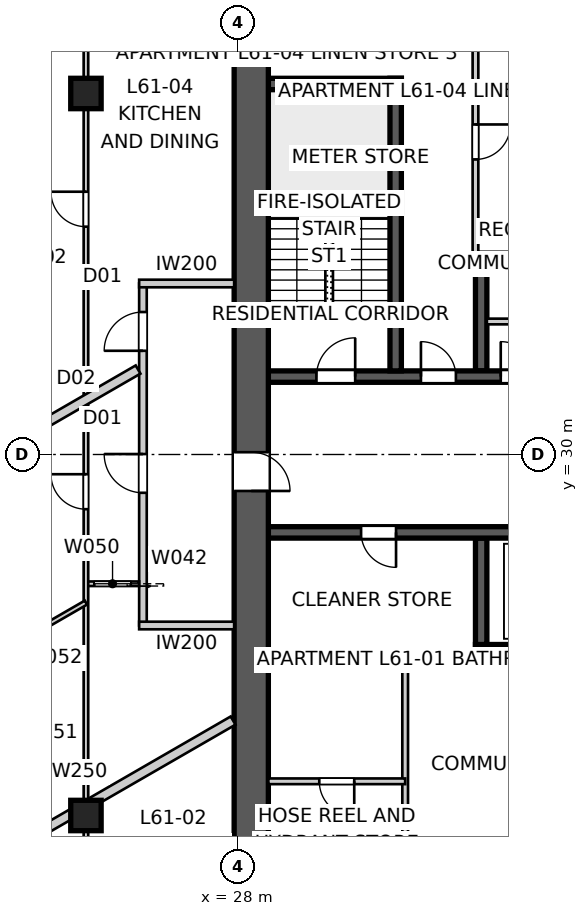
"""IFC4 building model, lengths in metres.
Left out: names, types, materials, properties, quantities, classifications, styles, units other than length and angle.
Written with IfcOpenShell. Run it as: python <this file> out.ifc"""

import sys

from ifc_helpers import new_model, si_unit, direction, frame, frame_2d, origin, origin_2d, place, context, subcontext, project, spatial, polyline, rectangle, outline, extrude, element, fill, save


model = new_model("IFC4")
c1 = context("Model", 3, precision=1e-05, world=origin(), true_north=direction((0.0, 1.0)))
c2 = subcontext(c1, "Body", "Model", "MODEL_VIEW")
j1 = project(units=[si_unit("LENGTHUNIT", "METRE"), si_unit("PLANEANGLEUNIT", "RADIAN")], contexts=[c1])
p1 = place(None, origin())
s1 = spatial("IfcSite", under=j1, at=p1, CompositionType="ELEMENT")
p2 = place(p1, origin())
s2 = spatial("IfcBuilding", under=s1, at=p2, CompositionType="ELEMENT")
p3 = place(p2, frame((0.0, 0.0, 221.8)))
s3 = spatial("IfcBuildingStorey", under=s2, at=p3, CompositionType="ELEMENT", Elevation=221.8)
p4 = place(p3, frame((28.35, 41.2, 0.0), z_axis=(0.0, 0.0, 1.0), x_axis=(0.0, -1.0, 0.0)))
e1 = element("IfcWall", 1, at=p4, inside=s3, PredefinedType="SHEAR", context=c2, shape_type="SweptSolid", body=[
    extrude(outline(polyline([(0.0, -0.45), (22.4, -0.45), (22.4, -0.025), (22.85, -0.025), (22.85, 0.025), (22.4, 0.025), (22.4, 0.45), (0.0, 0.45), (0.0, 0.025), (-0.45, 0.025), (-0.45, -0.025), (0.0, -0.025), (0.0, -0.45)])), origin(), (0.0, 0.0, 1.0), 3.4),
])
p5 = place(p4, frame((11.14, 0.0, 0.0)))
e2 = element("IfcOpeningElement", 2, at=p5, cuts=e1, PredefinedType="OPENING", context=c2, shape_type="SweptSolid", body=[
    extrude(rectangle(XDim=1.02, YDim=2.4, at=frame_2d((0.51, 1.2))), frame((0.0, 0.46, 0.0), z_axis=(0.0, -1.0, 0.0), x_axis=(1.0, 0.0, 0.0)), (0.0, 0.0, 1.0), 0.92),
])
p6 = place(p3, frame((28.8, 32.05, 0.0), z_axis=(0.0, 0.0, 1.0), x_axis=(1.0, 0.0, 0.0)))
e3 = element("IfcWall", 3, at=p6, inside=s3, PredefinedType="SHEAR", context=c2, shape_type="SweptSolid", body=[
    extrude(rectangle(XDim=22.4, YDim=0.3, at=frame_2d((11.2, 0.0))), origin(), (0.0, 0.0, 1.0), 3.4),
])
p7 = place(p6, frame((19.04, 0.0, 0.0)))
e4 = element("IfcOpeningElement", 4, at=p7, cuts=e3, PredefinedType="OPENING", context=c2, shape_type="SweptSolid", body=[
    extrude(rectangle(XDim=0.92, YDim=2.1, at=frame_2d((0.46, 1.05))), frame((0.0, 0.16, 0.0), z_axis=(0.0, -1.0, 0.0), x_axis=(1.0, 0.0, 0.0)), (0.0, 0.0, 1.0), 0.32),
])
p8 = place(p6, frame((1.265, 0.0, 0.0)))
e5 = element("IfcOpeningElement", 5, at=p8, cuts=e3, PredefinedType="OPENING", context=c2, shape_type="SweptSolid", body=[
    extrude(rectangle(XDim=1.02, YDim=2.1, at=frame_2d((0.51, 1.05))), frame((0.0, 0.16, 0.0), z_axis=(0.0, -1.0, 0.0), x_axis=(1.0, 0.0, 0.0)), (0.0, 0.0, 1.0), 0.32),
])
p9 = place(p6, frame((4.015, 0.0, 0.0)))
e6 = element("IfcOpeningElement", 6, at=p9, cuts=e3, PredefinedType="OPENING", context=c2, shape_type="SweptSolid", body=[
    extrude(rectangle(XDim=0.92, YDim=2.1, at=frame_2d((0.46, 1.05))), frame((0.0, 0.16, 0.0), z_axis=(0.0, -1.0, 0.0), x_axis=(1.0, 0.0, 0.0)), (0.0, 0.0, 1.0), 0.32),
])
p10 = place(p6, frame((6.115, 0.0, 0.0)))
e7 = element("IfcOpeningElement", 7, at=p10, cuts=e3, PredefinedType="OPENING", context=c2, shape_type="SweptSolid", body=[
    extrude(rectangle(XDim=0.92, YDim=2.1, at=frame_2d((0.46, 1.05))), frame((0.0, 0.16, 0.0), z_axis=(0.0, -1.0, 0.0), x_axis=(1.0, 0.0, 0.0)), (0.0, 0.0, 1.0), 0.32),
])
p11 = place(p6, frame((9.79, 0.0, 0.0)))
e8 = element("IfcOpeningElement", 8, at=p11, cuts=e3, PredefinedType="OPENING", context=c2, shape_type="SweptSolid", body=[
    extrude(rectangle(XDim=0.92, YDim=2.1, at=frame_2d((0.46, 1.05))), frame((0.0, 0.16, 0.0), z_axis=(0.0, -1.0, 0.0), x_axis=(1.0, 0.0, 0.0)), (0.0, 0.0, 1.0), 0.32),
])
p12 = place(p6, frame((12.05, 0.0, 0.0)))
e9 = element("IfcOpeningElement", 9, at=p12, cuts=e3, PredefinedType="OPENING", context=c2, shape_type="SweptSolid", body=[
    extrude(rectangle(XDim=1.1, YDim=2.1, at=frame_2d((0.55, 1.05))), frame((0.0, 0.16, 0.0), z_axis=(0.0, -1.0, 0.0), x_axis=(1.0, 0.0, 0.0)), (0.0, 0.0, 1.0), 0.32),
])
p13 = place(p6, frame((14.85, 0.0, 0.0)))
e10 = element("IfcOpeningElement", 10, at=p13, cuts=e3, PredefinedType="OPENING", context=c2, shape_type="SweptSolid", body=[
    extrude(rectangle(XDim=1.1, YDim=2.1, at=frame_2d((0.55, 1.05))), frame((0.0, 0.16, 0.0), z_axis=(0.0, -1.0, 0.0), x_axis=(1.0, 0.0, 0.0)), (0.0, 0.0, 1.0), 0.32),
])
p14 = place(p3, frame((51.2, 27.95, 0.0), z_axis=(0.0, 0.0, 1.0), x_axis=(-1.0, 0.0, 0.0)))
e11 = element("IfcWall", 11, at=p14, inside=s3, PredefinedType="SHEAR", context=c2, shape_type="SweptSolid", body=[
    extrude(rectangle(XDim=22.4, YDim=0.3, at=frame_2d((11.2, 0.0))), origin(), (0.0, 0.0, 1.0), 3.4),
])
p15 = place(p14, frame((19.04, 0.0, 0.0)))
e12 = element("IfcOpeningElement", 12, at=p15, cuts=e11, PredefinedType="OPENING", context=c2, shape_type="SweptSolid", body=[
    extrude(rectangle(XDim=0.92, YDim=2.1, at=frame_2d((0.46, 1.05))), frame((0.0, 0.16, 0.0), z_axis=(0.0, -1.0, 0.0), x_axis=(1.0, 0.0, 0.0)), (0.0, 0.0, 1.0), 0.32),
])
p16 = place(p14, frame((1.265, 0.0, 0.0)))
e13 = element("IfcOpeningElement", 13, at=p16, cuts=e11, PredefinedType="OPENING", context=c2, shape_type="SweptSolid", body=[
    extrude(rectangle(XDim=1.02, YDim=2.1, at=frame_2d((0.51, 1.05))), frame((0.0, 0.16, 0.0), z_axis=(0.0, -1.0, 0.0), x_axis=(1.0, 0.0, 0.0)), (0.0, 0.0, 1.0), 0.32),
])
p17 = place(p14, frame((4.015, 0.0, 0.0)))
e14 = element("IfcOpeningElement", 14, at=p17, cuts=e11, PredefinedType="OPENING", context=c2, shape_type="SweptSolid", body=[
    extrude(rectangle(XDim=0.92, YDim=2.1, at=frame_2d((0.46, 1.05))), frame((0.0, 0.16, 0.0), z_axis=(0.0, -1.0, 0.0), x_axis=(1.0, 0.0, 0.0)), (0.0, 0.0, 1.0), 0.32),
])
p18 = place(p14, frame((9.34, 0.0, 0.0)))
e15 = element("IfcOpeningElement", 15, at=p18, cuts=e11, PredefinedType="OPENING", context=c2, shape_type="SweptSolid", body=[
    extrude(rectangle(XDim=0.92, YDim=2.1, at=frame_2d((0.46, 1.05))), frame((0.0, 0.16, 0.0), z_axis=(0.0, -1.0, 0.0), x_axis=(1.0, 0.0, 0.0)), (0.0, 0.0, 1.0), 0.32),
])
p19 = place(p14, frame((7.015, 0.0, 0.0)))
e16 = element("IfcOpeningElement", 16, at=p19, cuts=e11, PredefinedType="OPENING", context=c2, shape_type="SweptSolid", body=[
    extrude(rectangle(XDim=0.92, YDim=2.1, at=frame_2d((0.46, 1.05))), frame((0.0, 0.16, 0.0), z_axis=(0.0, -1.0, 0.0), x_axis=(1.0, 0.0, 0.0)), (0.0, 0.0, 1.0), 0.32),
])
p20 = place(p14, frame((12.05, 0.0, 0.0)))
e17 = element("IfcOpeningElement", 17, at=p20, cuts=e11, PredefinedType="OPENING", context=c2, shape_type="SweptSolid", body=[
    extrude(rectangle(XDim=1.1, YDim=2.1, at=frame_2d((0.55, 1.05))), frame((0.0, 0.16, 0.0), z_axis=(0.0, -1.0, 0.0), x_axis=(1.0, 0.0, 0.0)), (0.0, 0.0, 1.0), 0.32),
])
p21 = place(p14, frame((14.85, 0.0, 0.0)))
e18 = element("IfcOpeningElement", 18, at=p21, cuts=e11, PredefinedType="OPENING", context=c2, shape_type="SweptSolid", body=[
    extrude(rectangle(XDim=1.1, YDim=2.1, at=frame_2d((0.55, 1.05))), frame((0.0, 0.16, 0.0), z_axis=(0.0, -1.0, 0.0), x_axis=(1.0, 0.0, 0.0)), (0.0, 0.0, 1.0), 0.32),
])
for number, where, z_axis, x_axis in (
    (19, (34.25, 35.15, 0.0), (0.0, 0.0, 1.0), (1.0, 0.0, 0.0)),
    (20, (45.75, 24.85, 0.0), (0.0, 0.0, 1.0), (-1.0, 0.0, 0.0)),
):
    element("IfcWall", number, at=place(p3, frame(where, z_axis=z_axis, x_axis=x_axis)), inside=s3, PredefinedType="SHEAR", context=c2, shape_type="SweptSolid", body=[
        extrude(rectangle(XDim=11.5, YDim=0.3, at=frame_2d((5.75, 0.0))), origin(), (0.0, 0.0, 1.0), 3.4),
    ])
for number, where, z_axis, x_axis in (
    (21, (34.4, 32.2, 0.0), (0.0, 0.0, 1.0), (0.0, 1.0, 0.0)),
    (22, (34.4, 27.8, 0.0), (0.0, 0.0, 1.0), (0.0, -1.0, 0.0)),
):
    element("IfcWall", number, at=place(p3, frame(where, z_axis=z_axis, x_axis=x_axis)), inside=s3, PredefinedType="SHEAR", context=c2, shape_type="SweptSolid", body=[
        extrude(rectangle(XDim=2.8, YDim=0.3, at=frame_2d((1.4, 0.0))), origin(), (0.0, 0.0, 1.0), 3.4),
    ])
p22 = place(p3, frame((32.15, 32.2, 0.0), z_axis=(0.0, 0.0, 1.0), x_axis=(0.0, 1.0, 0.0)))
e23 = element("IfcWall", 23, at=p22, inside=s3, PredefinedType="SHEAR", context=c2, shape_type="SweptSolid", body=[
    extrude(rectangle(XDim=7.7, YDim=0.3, at=frame_2d((3.85, 0.0))), origin(), (0.0, 0.0, 1.0), 3.4),
])
p23 = place(p3, frame((28.8, 39.75, 0.0), z_axis=(0.0, 0.0, 1.0), x_axis=(1.0, 0.0, 0.0)))
e24 = element("IfcWall", 24, at=p23, inside=s3, PredefinedType="SHEAR", context=c2, shape_type="SweptSolid", body=[
    extrude(rectangle(XDim=3.5, YDim=0.3, at=frame_2d((1.75, 0.0))), origin(), (0.0, 0.0, 1.0), 3.4),
])
for number, where, z_axis, x_axis in (
    (25, (24.0, 39.5, 0.0), (0.0, 0.0, 1.0), (1.0, 0.0, 0.0)),
    (26, (24.0, 20.5, 0.0), (0.0, 0.0, 1.0), (1.0, 0.0, 0.0)),
):
    element("IfcColumn", number, at=place(p3, frame(where, z_axis=z_axis, x_axis=x_axis)), inside=s3, PredefinedType="COLUMN", context=c2, shape_type="SweptSolid", body=[
        extrude(rectangle(XDim=0.8, YDim=0.8, at=origin_2d()), origin(), (0.0, 0.0, 1.0), 3.4),
    ])
p24 = place(p3, frame((25.5, 25.5, 0.0), z_axis=(0.0, 0.0, 1.0), x_axis=(0.0, 1.0, 0.0)))
e27 = element("IfcWall", 27, at=p24, inside=s3, PredefinedType="PARTITIONING", context=c2, shape_type="SweptSolid", body=[
    extrude(rectangle(XDim=9.0, YDim=0.2, at=frame_2d((4.5, 0.0))), origin(), (0.0, 0.0, 1.0), 3.25),
])
p25 = place(p24, frame((3.492, 0.0, 0.0)))
e28 = element("IfcOpeningElement", 28, at=p25, cuts=e27, PredefinedType="OPENING", context=c2, shape_type="SweptSolid", body=[
    extrude(rectangle(XDim=1.02, YDim=2.34, at=frame_2d((0.51, 1.17))), frame((0.0, 0.11, 0.0), z_axis=(0.0, -1.0, 0.0), x_axis=(1.0, 0.0, 0.0)), (0.0, 0.0, 1.0), 0.22),
])
p26 = place(p24, frame((7.229, 0.0, 0.0)))
e29 = element("IfcOpeningElement", 29, at=p26, cuts=e27, PredefinedType="OPENING", context=c2, shape_type="SweptSolid", body=[
    extrude(rectangle(XDim=1.02, YDim=2.34, at=frame_2d((0.51, 1.17))), frame((0.0, 0.11, 0.0), z_axis=(0.0, -1.0, 0.0), x_axis=(1.0, 0.0, 0.0)), (0.0, 0.0, 1.0), 0.22),
])
for number, where, z_axis, x_axis in (
    (30, (27.9, 34.5, 0.0), (0.0, 0.0, 1.0), (-1.0, 0.0, 0.0)),
    (31, (27.9, 25.5, 0.0), (0.0, 0.0, 1.0), (-1.0, 0.0, 0.0)),
):
    element("IfcWall", number, at=place(p3, frame(where, z_axis=z_axis, x_axis=x_axis)), inside=s3, PredefinedType="PARTITIONING", context=c2, shape_type="SweptSolid", body=[
        extrude(rectangle(XDim=2.5, YDim=0.2, at=frame_2d((1.25, 0.0))), origin(), (0.0, 0.0, 1.0), 3.25),
    ])
p27 = place(p3, frame((15.889, 26.761, 0.0), z_axis=(0.0, 0.0, 1.0), x_axis=(0.866024069551, 0.500002310952, 0.0)))
e32 = element("IfcWall", 32, at=p27, inside=s3, PredefinedType="PARTITIONING", context=c2, shape_type="SweptSolid", body=[
    extrude(rectangle(XDim=10.95, YDim=0.25, at=frame_2d((5.475, 0.0))), origin(), (0.0, 0.0, 1.0), 3.25),
])
p28 = place(p3, frame((20.514, 18.75, 0.0), z_axis=(0.0, 0.0, 1.0), x_axis=(0.866020489494, 0.500008511703, 0.0)))
e33 = element("IfcWall", 33, at=p28, inside=s3, PredefinedType="PARTITIONING", context=c2, shape_type="SweptSolid", body=[
    extrude(rectangle(XDim=8.496, YDim=0.25, at=frame_2d((4.248, 0.0))), origin(), (0.0, 0.0, 1.0), 3.25),
])
p29 = place(p3, frame((34.25, 41.2, 0.0), z_axis=(0.0, 0.0, 1.0), x_axis=(0.0, -1.0, 0.0)))
e34 = element("IfcWall", 34, at=p29, inside=s3, PredefinedType="SOLIDWALL", context=c2, shape_type="SweptSolid", body=[
    extrude(rectangle(XDim=5.95, YDim=0.15, at=frame_2d((2.975, 0.0))), origin(), (0.0, 0.0, 1.0), 3.25),
])
p30 = place(p29, frame((2.515, 0.0, 0.0)))
e35 = element("IfcOpeningElement", 35, at=p30, cuts=e34, PredefinedType="OPENING", context=c2, shape_type="SweptSolid", body=[
    extrude(rectangle(XDim=0.92, YDim=2.1, at=frame_2d((0.46, 1.05))), frame((0.0, 0.085, 0.0), z_axis=(0.0, -1.0, 0.0), x_axis=(1.0, 0.0, 0.0)), (0.0, 0.0, 1.0), 0.17),
])
p31 = place(p3, frame((32.4, 18.8, 0.0), z_axis=(0.0, 0.0, 1.0), x_axis=(0.0, 1.0, 0.0)))
e36 = element("IfcWall", 36, at=p31, inside=s3, PredefinedType="SOLIDWALL", context=c2, shape_type="SweptSolid", body=[
    extrude(rectangle(XDim=5.9, YDim=0.15, at=frame_2d((2.95, 0.0))), origin(), (0.0, 0.0, 1.0), 3.25),
])
p32 = place(p3, frame((32.4, 24.7, 0.0), z_axis=(0.0, 0.0, 1.0), x_axis=(1.0, 0.0, 0.0)))
e37 = element("IfcWall", 37, at=p32, inside=s3, PredefinedType="SOLIDWALL", context=c2, shape_type="SweptSolid", body=[
    extrude(rectangle(XDim=1.85, YDim=0.15, at=frame_2d((0.925, 0.0))), origin(), (0.0, 0.0, 1.0), 3.25),
])
p33 = place(p3, frame((32.4, 21.4, 0.0), z_axis=(0.0, 0.0, 1.0), x_axis=(-1.0, 0.0, 0.0)))
e38 = element("IfcWall", 38, at=p33, inside=s3, PredefinedType="SOLIDWALL", context=c2, shape_type="SweptSolid", body=[
    extrude(rectangle(XDim=3.6, YDim=0.15, at=frame_2d((1.8, 0.0))), origin(), (0.0, 0.0, 1.0), 3.25),
])
p34 = place(p33, frame((1.34, 0.0, 0.0)))
e39 = element("IfcOpeningElement", 39, at=p34, cuts=e38, PredefinedType="OPENING", context=c2, shape_type="SweptSolid", body=[
    extrude(rectangle(XDim=0.92, YDim=2.1, at=frame_2d((0.46, 1.05))), frame((0.0, 0.085, 0.0), z_axis=(0.0, -1.0, 0.0), x_axis=(1.0, 0.0, 0.0)), (0.0, 0.0, 1.0), 0.17),
])
p35 = place(p3, frame((25.4, 26.598, 0.0), z_axis=(0.0, 0.0, 1.0), x_axis=(-1.0, 0.0, 0.0)))
e40 = element("IfcWall", 40, at=p35, inside=s3, PredefinedType="PARTITIONING", context=c2, shape_type="SweptSolid", body=[
    extrude(rectangle(XDim=1.4, YDim=0.12, at=frame_2d((0.7, 0.0))), origin(), (0.0, 0.0, 1.0), 3.25),
])
p36 = place(p35, frame((0.22, 0.0, 0.0)))
e41 = element("IfcOpeningElement", 41, at=p36, cuts=e40, PredefinedType="OPENING", context=c2, shape_type="SweptSolid", body=[
    extrude(rectangle(XDim=0.96, YDim=2.1, at=frame_2d((0.48, 1.05))), frame((0.0, 0.07, 0.0), z_axis=(0.0, -1.0, 0.0), x_axis=(1.0, 0.0, 0.0)), (0.0, 0.0, 1.0), 0.14),
])
p37 = place(p3, frame((24.0, 15.422, 0.0), z_axis=(0.0, 0.0, 1.0), x_axis=(0.0, 1.0, 0.0)))
e42 = element("IfcWall", 42, at=p37, inside=s3, PredefinedType="PARTITIONING", context=c2, shape_type="SweptSolid", body=[
    extrude(rectangle(XDim=26.045, YDim=0.12, at=frame_2d((13.022, 0.0))), origin(), (0.0, 0.0, 1.0), 2.55),
])
p38 = place(p37, frame((13.139, 0.0, 0.0)))
e43 = element("IfcOpeningElement", 43, at=p38, cuts=e42, PredefinedType="OPENING", context=c2, shape_type="SweptSolid", body=[
    extrude(rectangle(XDim=0.92, YDim=2.34, at=frame_2d((0.46, 1.17))), frame((0.0, 0.07, 0.0), z_axis=(0.0, -1.0, 0.0), x_axis=(1.0, 0.0, 0.0)), (0.0, 0.0, 1.0), 0.14),
])
p39 = place(p37, frame((20.573, 0.0, 0.0)))
e44 = element("IfcOpeningElement", 44, at=p39, cuts=e42, PredefinedType="OPENING", context=c2, shape_type="SweptSolid", body=[
    extrude(rectangle(XDim=0.92, YDim=2.34, at=frame_2d((0.46, 1.17))), frame((0.0, 0.07, 0.0), z_axis=(0.0, -1.0, 0.0), x_axis=(1.0, 0.0, 0.0)), (0.0, 0.0, 1.0), 0.14),
])
p40 = place(p37, frame((0.42, 0.0, 0.0)))
e45 = element("IfcOpeningElement", 45, at=p40, cuts=e42, PredefinedType="OPENING", context=c2, shape_type="SweptSolid", body=[
    extrude(rectangle(XDim=0.92, YDim=2.34, at=frame_2d((0.46, 1.17))), frame((0.0, 0.07, 0.0), z_axis=(0.0, -1.0, 0.0), x_axis=(1.0, 0.0, 0.0)), (0.0, 0.0, 1.0), 0.14),
])
p41 = place(p3, frame((24.0, 26.103, 0.0), z_axis=(0.0, 0.0, 1.0), x_axis=(-0.866017585169, -0.500013541994, 0.0)))
e46 = element("IfcWall", 46, at=p41, inside=s3, PredefinedType="PARTITIONING", context=c2, shape_type="SweptSolid", body=[
    extrude(rectangle(XDim=6.655, YDim=0.12, at=frame_2d((3.328, 0.0))), origin(), (0.0, 0.0, 1.0), 3.25),
])
p42 = place(p41, frame((2.887, 0.0, 0.0)))
e47 = element("IfcOpeningElement", 47, at=p42, cuts=e46, PredefinedType="OPENING", context=c2, shape_type="SweptSolid", body=[
    extrude(rectangle(XDim=0.92, YDim=2.34, at=frame_2d((0.46, 1.17))), frame((0.0, 0.07, 0.0), z_axis=(0.0, -1.0, 0.0), x_axis=(1.0, 0.0, 0.0)), (0.0, 0.0, 1.0), 0.14),
])
p43 = place(p3, frame((34.55, 33.5, 0.0), z_axis=(0.0, 0.0, 1.0), x_axis=(1.0, 0.0, 0.0)))
e48 = element("IfcWall", 48, at=p43, inside=s3, PredefinedType="SOLIDWALL", context=c2, shape_type="SweptSolid", body=[
    extrude(rectangle(XDim=5.35, YDim=0.15, at=frame_2d((2.675, 0.0))), origin(), (0.0, 0.0, 1.0), 3.25),
])
p44 = place(p43, frame((2.215, 0.0, 0.0)))
e49 = element("IfcOpeningElement", 49, at=p44, cuts=e48, PredefinedType="OPENING", context=c2, shape_type="SweptSolid", body=[
    extrude(rectangle(XDim=0.92, YDim=2.1, at=frame_2d((0.46, 1.05))), frame((0.0, 0.085, 0.0), z_axis=(0.0, -1.0, 0.0), x_axis=(1.0, 0.0, 0.0)), (0.0, 0.0, 1.0), 0.17),
])
p45 = place(p15, origin())
e50 = element("IfcDoor", 50, at=p45, inside=s3, OperationType="SINGLE_SWING_LEFT", PredefinedType="DOOR", context=c2, shape_type="SweptSolid", body=[
    extrude(rectangle(XDim=0.92, YDim=2.1, at=frame_2d((0.46, 1.05))), frame((0.0, 0.025, 0.0), z_axis=(0.0, -1.0, 0.0), x_axis=(1.0, 0.0, 0.0)), (0.0, 0.0, 1.0), 0.05),
])
fill(e12, e50)
p46 = place(p8, origin())
e51 = element("IfcDoor", 51, at=p46, inside=s3, OperationType="SINGLE_SWING_RIGHT", PredefinedType="DOOR", context=c2, shape_type="SweptSolid", body=[
    extrude(rectangle(XDim=1.02, YDim=2.1, at=frame_2d((0.51, 1.05))), frame((0.0, 0.025, 0.0), z_axis=(0.0, -1.0, 0.0), x_axis=(1.0, 0.0, 0.0)), (0.0, 0.0, 1.0), 0.05),
])
fill(e5, e51)
p47 = place(p9, origin())
e52 = element("IfcDoor", 52, at=p47, inside=s3, OperationType="SINGLE_SWING_LEFT", PredefinedType="DOOR", context=c2, shape_type="SweptSolid", body=[
    extrude(rectangle(XDim=0.92, YDim=2.1, at=frame_2d((0.46, 1.05))), frame((0.0, 0.025, 0.0), z_axis=(0.0, -1.0, 0.0), x_axis=(1.0, 0.0, 0.0)), (0.0, 0.0, 1.0), 0.05),
])
fill(e6, e52)
p48 = place(p25, origin())
e53 = element("IfcDoor", 53, at=p48, inside=s3, OperationType="SINGLE_SWING_RIGHT", PredefinedType="DOOR", context=c2, shape_type="SweptSolid", body=[
    extrude(rectangle(XDim=1.02, YDim=2.34, at=frame_2d((0.51, 1.17))), frame((0.0, 0.025, 0.0), z_axis=(0.0, -1.0, 0.0), x_axis=(1.0, 0.0, 0.0)), (0.0, 0.0, 1.0), 0.05),
])
fill(e28, e53)
p49 = place(p26, origin())
e54 = element("IfcDoor", 54, at=p49, inside=s3, OperationType="SINGLE_SWING_LEFT", PredefinedType="DOOR", context=c2, shape_type="SweptSolid", body=[
    extrude(rectangle(XDim=1.02, YDim=2.34, at=frame_2d((0.51, 1.17))), frame((0.0, 0.025, 0.0), z_axis=(0.0, -1.0, 0.0), x_axis=(1.0, 0.0, 0.0)), (0.0, 0.0, 1.0), 0.05),
])
fill(e29, e54)
p50 = place(p34, origin())
e55 = element("IfcDoor", 55, at=p50, inside=s3, OperationType="SINGLE_SWING_LEFT", PredefinedType="DOOR", context=c2, shape_type="SweptSolid", body=[
    extrude(rectangle(XDim=0.92, YDim=2.1, at=frame_2d((0.46, 1.05))), frame((0.0, 0.025, 0.0), z_axis=(0.0, -1.0, 0.0), x_axis=(1.0, 0.0, 0.0)), (0.0, 0.0, 1.0), 0.05),
])
fill(e39, e55)
p51 = place(p30, origin())
e56 = element("IfcDoor", 56, at=p51, inside=s3, OperationType="SINGLE_SWING_LEFT", PredefinedType="DOOR", context=c2, shape_type="SweptSolid", body=[
    extrude(rectangle(XDim=0.92, YDim=2.1, at=frame_2d((0.46, 1.05))), frame((0.0, 0.025, 0.0), z_axis=(0.0, -1.0, 0.0), x_axis=(1.0, 0.0, 0.0)), (0.0, 0.0, 1.0), 0.05),
])
fill(e35, e56)
p52 = place(p38, origin())
e57 = element("IfcDoor", 57, at=p52, inside=s3, OperationType="SINGLE_SWING_RIGHT", PredefinedType="DOOR", context=c2, shape_type="SweptSolid", body=[
    extrude(rectangle(XDim=0.92, YDim=2.34, at=frame_2d((0.46, 1.17))), frame((0.0, 0.025, 0.0), z_axis=(0.0, -1.0, 0.0), x_axis=(1.0, 0.0, 0.0)), (0.0, 0.0, 1.0), 0.05),
])
fill(e43, e57)
p53 = place(p36, origin())
e58 = element("IfcDoor", 58, at=p53, inside=s3, OperationType="SLIDING_TO_LEFT", PredefinedType="DOOR", context=c2, shape_type="SweptSolid", body=[
    extrude(rectangle(XDim=0.96, YDim=2.1, at=frame_2d((0.48, 1.05))), frame((0.0, 0.025, 0.0), z_axis=(0.0, -1.0, 0.0), x_axis=(1.0, 0.0, 0.0)), (0.0, 0.0, 1.0), 0.05),
])
fill(e41, e58)
p54 = place(p39, origin())
e59 = element("IfcDoor", 59, at=p54, inside=s3, OperationType="SINGLE_SWING_RIGHT", PredefinedType="DOOR", context=c2, shape_type="SweptSolid", body=[
    extrude(rectangle(XDim=0.92, YDim=2.34, at=frame_2d((0.46, 1.17))), frame((0.0, 0.025, 0.0), z_axis=(0.0, -1.0, 0.0), x_axis=(1.0, 0.0, 0.0)), (0.0, 0.0, 1.0), 0.05),
])
fill(e44, e59)
p55 = place(p10, origin())
e60 = element("IfcDoor", 60, at=p55, inside=s3, OperationType="SINGLE_SWING_LEFT", PredefinedType="DOOR", context=c2, shape_type="SweptSolid", body=[
    extrude(rectangle(XDim=0.92, YDim=2.1, at=frame_2d((0.46, 1.05))), frame((0.0, 0.025, 0.0), z_axis=(0.0, -1.0, 0.0), x_axis=(1.0, 0.0, 0.0)), (0.0, 0.0, 1.0), 0.05),
])
fill(e7, e60)
p56 = place(p5, origin())
e61 = element("IfcDoor", 61, at=p56, inside=s3, OperationType="SINGLE_SWING_RIGHT", PredefinedType="DOOR", context=c2, shape_type="SweptSolid", body=[
    extrude(rectangle(XDim=1.02, YDim=2.4, at=frame_2d((0.51, 1.2))), frame((0.0, 0.025, 0.0), z_axis=(0.0, -1.0, 0.0), x_axis=(1.0, 0.0, 0.0)), (0.0, 0.0, 1.0), 0.05),
])
fill(e2, e61)
save(model, sys.argv[1])
